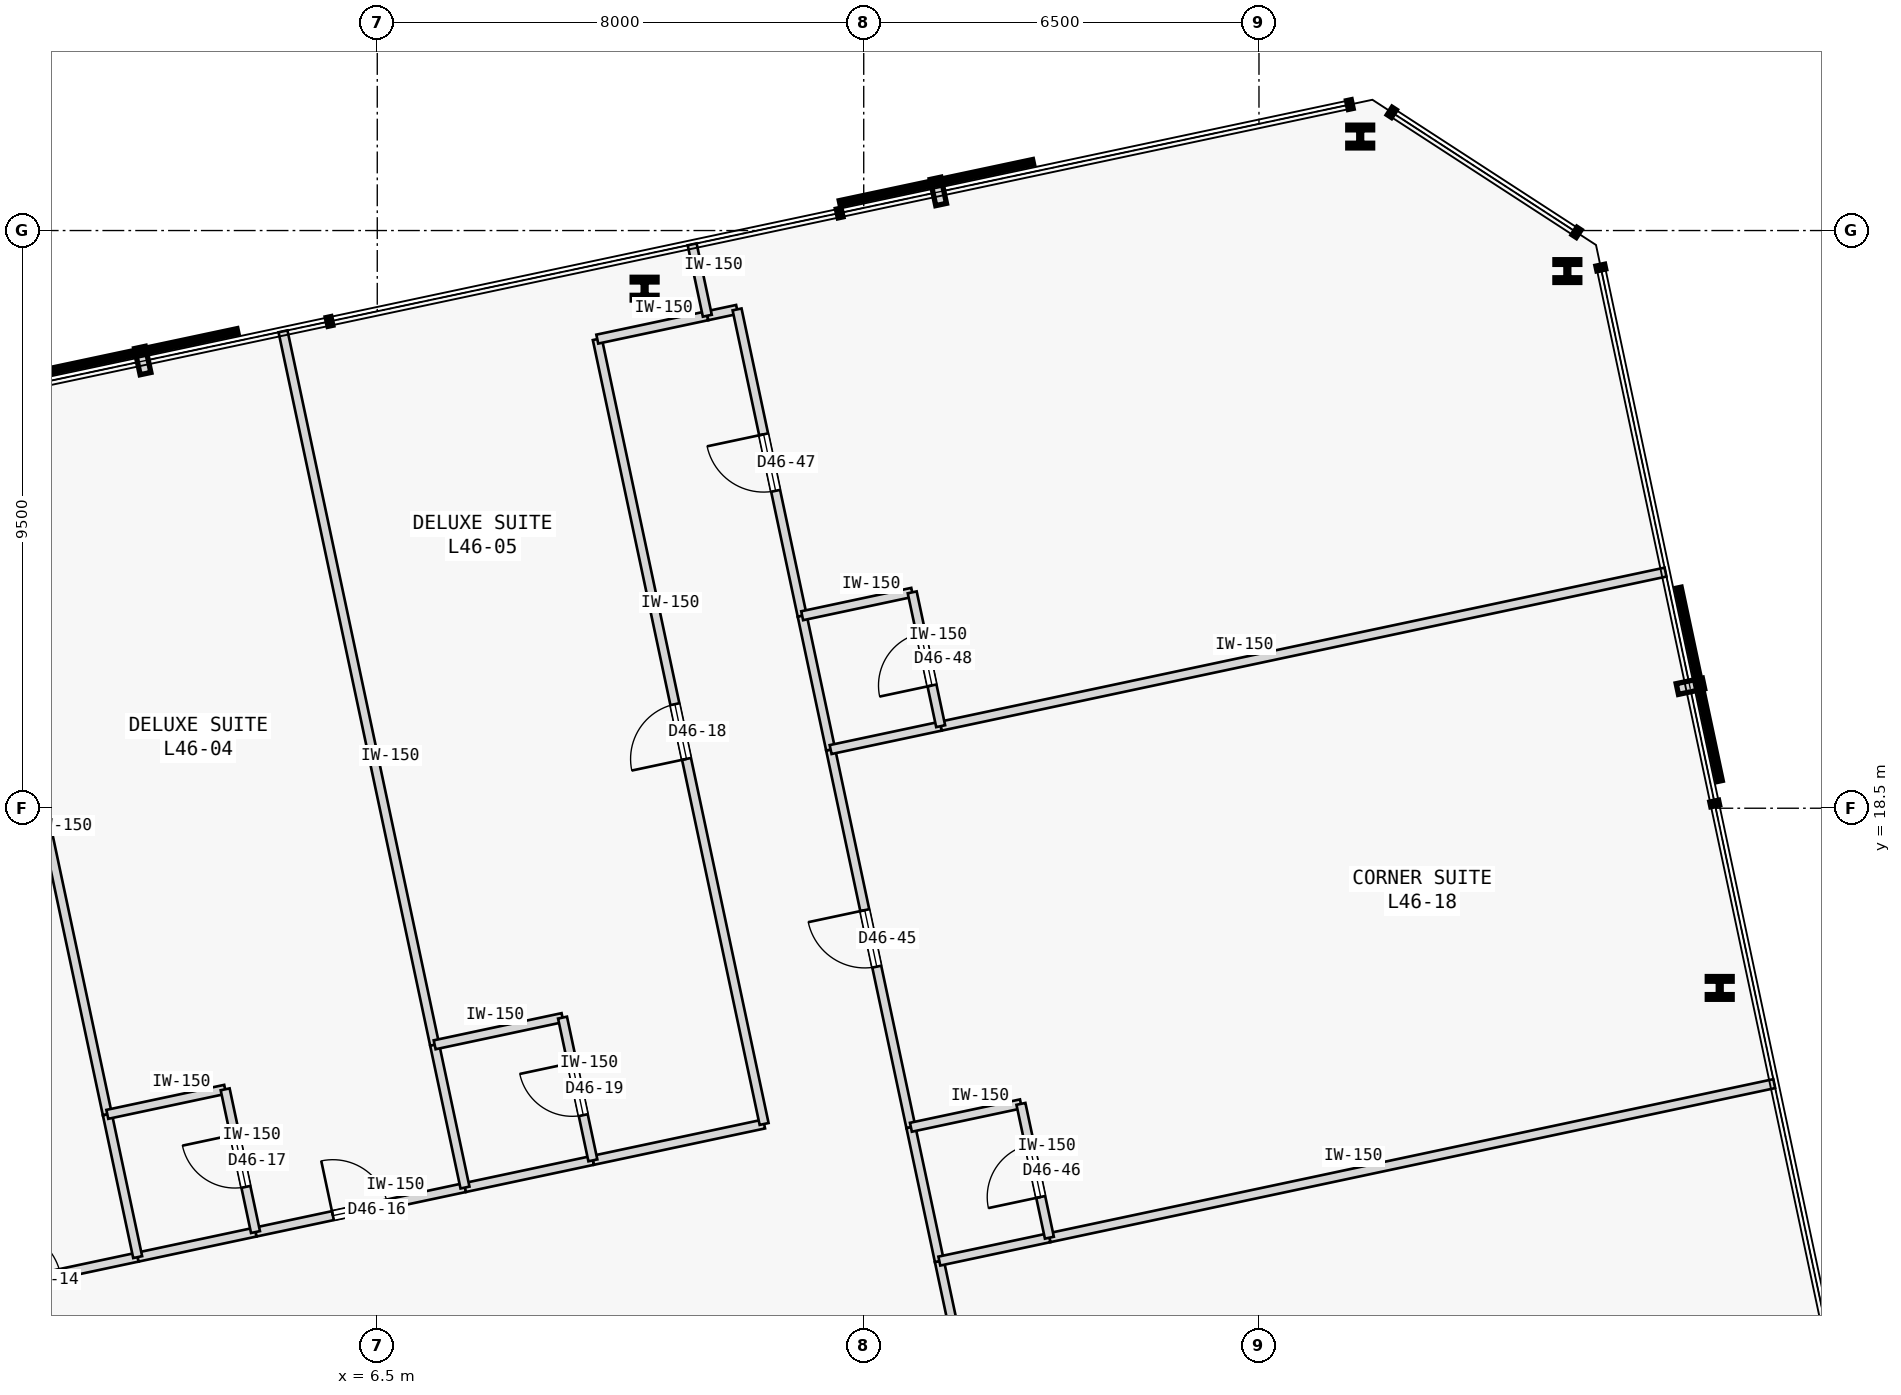
"""IFC4 building model, lengths in metres.
Left out: names, types, materials, properties, quantities, classifications, styles, units other than length and angle.
Written with IfcOpenShell. Run it as: python <this file> out.ifc"""

import sys

from ifc_helpers import new_model, si_unit, direction, frame, frame_2d, origin, origin_2d, place, context, subcontext, project, spatial, rectangle, i_section, extrude, element, fill, save


model = new_model("IFC4")
c1 = context("Model", 3, precision=1e-05, world=origin(), true_north=direction((0.0, 1.0)))
c2 = subcontext(c1, "Body", "Model", "MODEL_VIEW")
j1 = project(units=[si_unit("LENGTHUNIT", "METRE"), si_unit("PLANEANGLEUNIT", "RADIAN")], contexts=[c1])
p1 = place(None, origin())
s1 = spatial("IfcSite", under=j1, at=p1, CompositionType="ELEMENT")
p2 = place(p1, origin())
s2 = spatial("IfcBuilding", under=s1, at=p2, CompositionType="ELEMENT")
p3 = place(p2, frame((0.0, 0.0, 178.6)))
s3 = spatial("IfcBuildingStorey", under=s2, at=p3, CompositionType="ELEMENT", Elevation=178.6)
for number, where, z_axis, x_axis in (
    (1, (28.577, 15.545, 0.0), (0.0, 0.0, 1.0), (1.0, 0.0, 0.0)),
    (2, (26.071, 27.333, 0.0), (0.0, 0.0, 1.0), (1.0, 0.0, 0.0)),
    (3, (22.665, 29.546, 0.0), (0.0, 0.0, 1.0), (1.0, 0.0, 0.0)),
    (4, (10.896, 27.044, 0.0), (0.0, 0.0, 1.0), (1.0, 0.0, 0.0)),
):
    element("IfcColumn", number, at=place(p3, frame(where, z_axis=z_axis, x_axis=x_axis)), inside=s3, PredefinedType="COLUMN", context=c2, shape_type="SweptSolid", body=[
        extrude(i_section(OverallWidth=0.409, OverallDepth=0.374, WebThickness=0.048, FlangeThickness=0.077, FilletRadius=0.015, at=origin_2d()), origin(), (0.0, 0.0, 1.0), 3.4),
    ])
p4 = place(p3, frame((-0.885, 10.386, 0.0), z_axis=(0.0, 0.0, 1.0), x_axis=(0.978153036861, 0.207886114205, 0.0)))
e5 = element("IfcWall", 5, at=p4, inside=s3, PredefinedType="PARTITIONING", context=c2, shape_type="SweptSolid", body=[
    extrude(rectangle(XDim=3.522, YDim=0.15, at=frame_2d((1.761, 0.0))), origin(), (0.0, 0.0, 1.0), 3.175),
])
p5 = place(p4, frame((1.301, 0.0, 0.0)))
e6 = element("IfcOpeningElement", 6, at=p5, cuts=e5, PredefinedType="OPENING", context=c2, shape_type="SweptSolid", body=[
    extrude(rectangle(XDim=0.92, YDim=2.15, at=frame_2d((0.46, 1.075))), frame((0.0, 0.085, 0.0), z_axis=(0.0, -1.0, 0.0), x_axis=(1.0, 0.0, 0.0)), (0.0, 0.0, 1.0), 0.17),
])
p6 = place(p3, frame((4.498, 11.53, 0.0), z_axis=(0.0, 0.0, 1.0), x_axis=(0.978135941404, 0.207966536089, 0.0)))
e7 = element("IfcWall", 7, at=p6, inside=s3, PredefinedType="PARTITIONING", context=c2, shape_type="SweptSolid", body=[
    extrude(rectangle(XDim=3.522, YDim=0.15, at=frame_2d((1.761, 0.0))), origin(), (0.0, 0.0, 1.0), 3.175),
])
p7 = place(p6, frame((1.301, 0.0, 0.0)))
e8 = element("IfcOpeningElement", 8, at=p7, cuts=e7, PredefinedType="OPENING", context=c2, shape_type="SweptSolid", body=[
    extrude(rectangle(XDim=0.92, YDim=2.15, at=frame_2d((0.46, 1.075))), frame((0.0, 0.085, 0.0), z_axis=(0.0, -1.0, 0.0), x_axis=(1.0, 0.0, 0.0)), (0.0, 0.0, 1.0), 0.17),
])
p8 = place(p3, frame((2.56, 11.118, 0.0), z_axis=(0.0, 0.0, 1.0), x_axis=(0.978149140323, 0.20790444749, 0.0)))
e9 = element("IfcWall", 9, at=p8, inside=s3, PredefinedType="PARTITIONING", context=c2, shape_type="SweptSolid", body=[
    extrude(rectangle(XDim=1.981, YDim=0.15, at=frame_2d((0.99, 0.0))), origin(), (0.0, 0.0, 1.0), 3.175),
])
p9 = place(p3, frame((10.046, 12.709, 0.0), z_axis=(0.0, 0.0, 1.0), x_axis=(0.97816208355, 0.207843542851, 0.0)))
e10 = element("IfcWall", 10, at=p9, inside=s3, PredefinedType="PARTITIONING", context=c2, shape_type="SweptSolid", body=[
    extrude(rectangle(XDim=2.879, YDim=0.15, at=frame_2d((1.439, 0.0))), origin(), (0.0, 0.0, 1.0), 3.175),
])
p10 = place(p3, frame((12.862, 13.308, 0.0), z_axis=(0.0, 0.0, 1.0), x_axis=(-0.207911421929, 0.978147657888, 0.0)))
e11 = element("IfcWall", 11, at=p10, inside=s3, PredefinedType="PARTITIONING", context=c2, shape_type="SweptSolid", body=[
    extrude(rectangle(XDim=13.195, YDim=0.15, at=frame_2d((6.598, 0.0))), origin(), (0.0, 0.0, 1.0), 3.175),
])
p11 = place(p10, frame((6.137, 0.0, 0.0)))
e12 = element("IfcOpeningElement", 12, at=p11, cuts=e11, PredefinedType="OPENING", context=c2, shape_type="SweptSolid", body=[
    extrude(rectangle(XDim=0.92, YDim=2.15, at=frame_2d((0.46, 1.075))), frame((0.0, 0.085, 0.0), z_axis=(0.0, -1.0, 0.0), x_axis=(1.0, 0.0, 0.0)), (0.0, 0.0, 1.0), 0.17),
])
p12 = place(p3, frame((10.118, 26.214, 0.0), z_axis=(0.0, 0.0, 1.0), x_axis=(0.978133353907, 0.20797870558, 0.0)))
e13 = element("IfcWall", 13, at=p12, inside=s3, PredefinedType="PARTITIONING", context=c2, shape_type="SweptSolid", body=[
    extrude(rectangle(XDim=1.85, YDim=0.15, at=frame_2d((0.925, 0.0))), origin(), (0.0, 0.0, 1.0), 3.175),
])
p13 = place(p3, frame((7.943, 12.262, 0.0), z_axis=(0.0, 0.0, 1.0), x_axis=(0.978146728319, 0.207915795165, 0.0)))
e14 = element("IfcWall", 14, at=p13, inside=s3, PredefinedType="PARTITIONING", context=c2, shape_type="SweptSolid", body=[
    extrude(rectangle(XDim=2.15, YDim=0.15, at=frame_2d((1.075, 0.0))), origin(), (0.0, 0.0, 1.0), 3.175),
])
p14 = place(p3, frame((17.064, 4.841, 0.0), z_axis=(0.0, 0.0, 1.0), x_axis=(-0.207924511115, 0.978144875608, 0.0)))
e15 = element("IfcWall", 15, at=p14, inside=s3, PredefinedType="PARTITIONING", context=c2, shape_type="SweptSolid", body=[
    extrude(rectangle(XDim=6.35, YDim=0.15, at=frame_2d((3.175, 0.0))), origin(), (0.0, 0.0, 1.0), 3.175),
])
p15 = place(p14, frame((2.7, 0.0, 0.0)))
e16 = element("IfcOpeningElement", 16, at=p15, cuts=e15, PredefinedType="OPENING", context=c2, shape_type="SweptSolid", body=[
    extrude(rectangle(XDim=0.95, YDim=2.15, at=frame_2d((0.475, 1.075))), frame((0.0, 0.085, 0.0), z_axis=(0.0, -1.0, 0.0), x_axis=(1.0, 0.0, 0.0)), (0.0, 0.0, 1.0), 0.17),
])
p16 = place(p3, frame((15.276, 13.253, 0.0), z_axis=(0.0, 0.0, 1.0), x_axis=(-0.207924511115, 0.978144875608, 0.0)))
e17 = element("IfcWall", 17, at=p16, inside=s3, PredefinedType="PARTITIONING", context=c2, shape_type="SweptSolid", body=[
    extrude(rectangle(XDim=6.35, YDim=0.15, at=frame_2d((3.175, 0.0))), origin(), (0.0, 0.0, 1.0), 3.175),
])
p17 = place(p16, frame((2.7, 0.0, 0.0)))
e18 = element("IfcOpeningElement", 18, at=p17, cuts=e17, PredefinedType="OPENING", context=c2, shape_type="SweptSolid", body=[
    extrude(rectangle(XDim=0.95, YDim=2.15, at=frame_2d((0.475, 1.075))), frame((0.0, 0.085, 0.0), z_axis=(0.0, -1.0, 0.0), x_axis=(1.0, 0.0, 0.0)), (0.0, 0.0, 1.0), 0.17),
])
p18 = place(p3, frame((15.744, 11.052, 0.0), z_axis=(0.0, 0.0, 1.0), x_axis=(-0.207891197838, 0.978151956427, 0.0)))
e19 = element("IfcWall", 19, at=p18, inside=s3, PredefinedType="PARTITIONING", context=c2, shape_type="SweptSolid", body=[
    extrude(rectangle(XDim=2.25, YDim=0.15, at=frame_2d((1.125, 0.0))), origin(), (0.0, 0.0, 1.0), 3.175),
])
p19 = place(p3, frame((11.928, 26.599, 0.0), z_axis=(0.0, 0.0, 1.0), x_axis=(0.97822210712, 0.207560856478, 0.0)))
e20 = element("IfcWall", 20, at=p19, inside=s3, PredefinedType="PARTITIONING", context=c2, shape_type="SweptSolid", body=[
    extrude(rectangle(XDim=0.5, YDim=0.15, at=frame_2d((0.25, 0.0))), origin(), (0.0, 0.0, 1.0), 3.175),
])
p20 = place(p3, frame((13.488, 21.666, 0.0), z_axis=(0.0, 0.0, 1.0), x_axis=(-0.207926226209, 0.978144511028, 0.0)))
e21 = element("IfcWall", 21, at=p20, inside=s3, PredefinedType="PARTITIONING", context=c2, shape_type="SweptSolid", body=[
    extrude(rectangle(XDim=5.15, YDim=0.15, at=frame_2d((2.575, 0.0))), origin(), (0.0, 0.0, 1.0), 3.175),
])
p21 = place(p20, frame((2.1, 0.0, 0.0)))
e22 = element("IfcOpeningElement", 22, at=p21, cuts=e21, PredefinedType="OPENING", context=c2, shape_type="SweptSolid", body=[
    extrude(rectangle(XDim=0.95, YDim=2.15, at=frame_2d((0.475, 1.075))), frame((0.0, 0.085, 0.0), z_axis=(0.0, -1.0, 0.0), x_axis=(1.0, 0.0, 0.0)), (0.0, 0.0, 1.0), 0.17),
])
p22 = place(p3, frame((13.956, 19.465, 0.0), z_axis=(0.0, 0.0, 1.0), x_axis=(-0.207891197838, 0.978151956427, 0.0)))
e23 = element("IfcWall", 23, at=p22, inside=s3, PredefinedType="PARTITIONING", context=c2, shape_type="SweptSolid", body=[
    extrude(rectangle(XDim=2.25, YDim=0.15, at=frame_2d((1.125, 0.0))), origin(), (0.0, 0.0, 1.0), 3.175),
])
p23 = place(p3, frame((2.061, 13.466, 0.0), z_axis=(0.0, 0.0, 1.0), x_axis=(-0.207910848762, 0.978147779718, 0.0)))
e24 = element("IfcWall", 24, at=p23, inside=s3, PredefinedType="PARTITIONING", context=c2, shape_type="SweptSolid", body=[
    extrude(rectangle(XDim=11.995, YDim=0.15, at=frame_2d((5.998, 0.0))), origin(), (0.0, 0.0, 1.0), 3.175),
])
p24 = place(p3, frame((2.56, 11.118, 0.0), z_axis=(0.0, 0.0, 1.0), x_axis=(-0.207917150959, 0.978146440129, 0.0)))
e25 = element("IfcWall", 25, at=p24, inside=s3, PredefinedType="PARTITIONING", context=c2, shape_type="SweptSolid", body=[
    extrude(rectangle(XDim=2.4, YDim=0.15, at=frame_2d((1.2, 0.0))), origin(), (0.0, 0.0, 1.0), 3.175),
])
p25 = place(p3, frame((2.061, 13.466, 0.0), z_axis=(0.0, 0.0, 1.0), x_axis=(0.978149140323, 0.20790444749, 0.0)))
e26 = element("IfcWall", 26, at=p25, inside=s3, PredefinedType="PARTITIONING", context=c2, shape_type="SweptSolid", body=[
    extrude(rectangle(XDim=1.981, YDim=0.15, at=frame_2d((0.99, 0.0))), origin(), (0.0, 0.0, 1.0), 3.175),
])
p26 = place(p3, frame((4.498, 11.53, 0.0), z_axis=(0.0, 0.0, 1.0), x_axis=(-0.207917150959, 0.978146440129, 0.0)))
e27 = element("IfcWall", 27, at=p26, inside=s3, PredefinedType="PARTITIONING", context=c2, shape_type="SweptSolid", body=[
    extrude(rectangle(XDim=2.4, YDim=0.15, at=frame_2d((1.2, 0.0))), origin(), (0.0, 0.0, 1.0), 3.175),
])
p27 = place(p26, frame((0.76, 0.0, 0.0)))
e28 = element("IfcOpeningElement", 28, at=p27, cuts=e27, PredefinedType="OPENING", context=c2, shape_type="SweptSolid", body=[
    extrude(rectangle(XDim=0.88, YDim=2.15, at=frame_2d((0.44, 1.075))), frame((0.0, 0.085, 0.0), z_axis=(0.0, -1.0, 0.0), x_axis=(1.0, 0.0, 0.0)), (0.0, 0.0, 1.0), 0.17),
])
p28 = place(p3, frame((7.444, 14.61, 0.0), z_axis=(0.0, 0.0, 1.0), x_axis=(-0.207910848762, 0.978147779718, 0.0)))
e29 = element("IfcWall", 29, at=p28, inside=s3, PredefinedType="PARTITIONING", context=c2, shape_type="SweptSolid", body=[
    extrude(rectangle(XDim=11.995, YDim=0.15, at=frame_2d((5.998, 0.0))), origin(), (0.0, 0.0, 1.0), 3.175),
])
p29 = place(p3, frame((7.943, 12.262, 0.0), z_axis=(0.0, 0.0, 1.0), x_axis=(-0.207937840262, 0.978142042133, 0.0)))
e30 = element("IfcWall", 30, at=p29, inside=s3, PredefinedType="PARTITIONING", context=c2, shape_type="SweptSolid", body=[
    extrude(rectangle(XDim=2.4, YDim=0.15, at=frame_2d((1.2, 0.0))), origin(), (0.0, 0.0, 1.0), 3.175),
])
p30 = place(p3, frame((7.444, 14.61, 0.0), z_axis=(0.0, 0.0, 1.0), x_axis=(0.978151636287, 0.207892704126, 0.0)))
e31 = element("IfcWall", 31, at=p30, inside=s3, PredefinedType="PARTITIONING", context=c2, shape_type="SweptSolid", body=[
    extrude(rectangle(XDim=2.15, YDim=0.15, at=frame_2d((1.075, 0.0))), origin(), (0.0, 0.0, 1.0), 3.175),
])
p31 = place(p3, frame((10.046, 12.709, 0.0), z_axis=(0.0, 0.0, 1.0), x_axis=(-0.207840504985, 0.978162729042, 0.0)))
e32 = element("IfcWall", 32, at=p31, inside=s3, PredefinedType="PARTITIONING", context=c2, shape_type="SweptSolid", body=[
    extrude(rectangle(XDim=2.4, YDim=0.15, at=frame_2d((1.2, 0.0))), origin(), (0.0, 0.0, 1.0), 3.175),
])
p32 = place(p31, frame((0.76, 0.0, 0.0)))
e33 = element("IfcOpeningElement", 33, at=p32, cuts=e32, PredefinedType="OPENING", context=c2, shape_type="SweptSolid", body=[
    extrude(rectangle(XDim=0.88, YDim=2.15, at=frame_2d((0.44, 1.075))), frame((0.0, 0.085, 0.0), z_axis=(0.0, -1.0, 0.0), x_axis=(1.0, 0.0, 0.0)), (0.0, 0.0, 1.0), 0.17),
])
p33 = place(p3, frame((11.928, 26.599, 0.0), z_axis=(0.0, 0.0, 1.0), x_axis=(-0.20795853359, 0.978137642823, 0.0)))
e34 = element("IfcWall", 34, at=p33, inside=s3, PredefinedType="PARTITIONING", context=c2, shape_type="SweptSolid", body=[
    extrude(rectangle(XDim=1.2, YDim=0.15, at=frame_2d((0.6, 0.0))), origin(), (0.0, 0.0, 1.0), 3.175),
])
p34 = place(p3, frame((17.553, 11.437, 0.0), z_axis=(0.0, 0.0, 1.0), x_axis=(0.97814556055, 0.207921288896, 0.0)))
e35 = element("IfcWall", 35, at=p34, inside=s3, PredefinedType="PARTITIONING", context=c2, shape_type="SweptSolid", body=[
    extrude(rectangle(XDim=12.187, YDim=0.15, at=frame_2d((6.094, 0.0))), origin(), (0.0, 0.0, 1.0), 3.175),
])
for number, where, z_axis, x_axis in (
    (36, (15.744, 11.052, 0.0), (0.0, 0.0, 1.0), (0.978, 0.208, 0.0)),
    (37, (15.276, 13.253, 0.0), (0.0, 0.0, 1.0), (0.978, 0.208, 0.0)),
):
    element("IfcWall", number, at=place(p3, frame(where, z_axis=z_axis, x_axis=x_axis)), inside=s3, PredefinedType="PARTITIONING", context=c2, shape_type="SweptSolid", body=[
        extrude(rectangle(XDim=1.85, YDim=0.15, at=frame_2d((0.925, 0.0))), origin(), (0.0, 0.0, 1.0), 3.175),
    ])
p35 = place(p3, frame((17.553, 11.437, 0.0), z_axis=(0.0, 0.0, 1.0), x_axis=(-0.207891197838, 0.978151956427, 0.0)))
e38 = element("IfcWall", 38, at=p35, inside=s3, PredefinedType="PARTITIONING", context=c2, shape_type="SweptSolid", body=[
    extrude(rectangle(XDim=2.25, YDim=0.15, at=frame_2d((1.125, 0.0))), origin(), (0.0, 0.0, 1.0), 3.175),
])
p36 = place(p35, frame((0.685, 0.0, 0.0)))
e39 = element("IfcOpeningElement", 39, at=p36, cuts=e38, PredefinedType="OPENING", context=c2, shape_type="SweptSolid", body=[
    extrude(rectangle(XDim=0.88, YDim=2.15, at=frame_2d((0.44, 1.075))), frame((0.0, 0.085, 0.0), z_axis=(0.0, -1.0, 0.0), x_axis=(1.0, 0.0, 0.0)), (0.0, 0.0, 1.0), 0.17),
])
p37 = place(p3, frame((15.765, 19.849, 0.0), z_axis=(0.0, 0.0, 1.0), x_axis=(0.978149634612, 0.207902121941, 0.0)))
e40 = element("IfcWall", 40, at=p37, inside=s3, PredefinedType="PARTITIONING", context=c2, shape_type="SweptSolid", body=[
    extrude(rectangle(XDim=12.187, YDim=0.15, at=frame_2d((6.094, 0.0))), origin(), (0.0, 0.0, 1.0), 3.175),
])
for number, where, z_axis, x_axis in (
    (41, (13.956, 19.465, 0.0), (0.0, 0.0, 1.0), (0.978, 0.208, 0.0)),
    (42, (13.488, 21.666, 0.0), (0.0, 0.0, 1.0), (0.978, 0.208, 0.0)),
):
    element("IfcWall", number, at=place(p3, frame(where, z_axis=z_axis, x_axis=x_axis)), inside=s3, PredefinedType="PARTITIONING", context=c2, shape_type="SweptSolid", body=[
        extrude(rectangle(XDim=1.85, YDim=0.15, at=frame_2d((0.925, 0.0))), origin(), (0.0, 0.0, 1.0), 3.175),
    ])
p38 = place(p3, frame((15.765, 19.849, 0.0), z_axis=(0.0, 0.0, 1.0), x_axis=(-0.207891197838, 0.978151956427, 0.0)))
e43 = element("IfcWall", 43, at=p38, inside=s3, PredefinedType="PARTITIONING", context=c2, shape_type="SweptSolid", body=[
    extrude(rectangle(XDim=2.25, YDim=0.15, at=frame_2d((1.125, 0.0))), origin(), (0.0, 0.0, 1.0), 3.175),
])
p39 = place(p38, frame((0.685, 0.0, 0.0)))
e44 = element("IfcOpeningElement", 44, at=p39, cuts=e43, PredefinedType="OPENING", context=c2, shape_type="SweptSolid", body=[
    extrude(rectangle(XDim=0.88, YDim=2.15, at=frame_2d((0.44, 1.075))), frame((0.0, 0.085, 0.0), z_axis=(0.0, -1.0, 0.0), x_axis=(1.0, 0.0, 0.0)), (0.0, 0.0, 1.0), 0.17),
])
p40 = place(p5, origin())
e45 = element("IfcDoor", 45, at=p40, inside=s3, OperationType="SINGLE_SWING_LEFT", PredefinedType="DOOR", context=c2, shape_type="SweptSolid", body=[
    extrude(rectangle(XDim=0.92, YDim=2.15, at=frame_2d((0.46, 1.075))), frame((0.0, 0.025, 0.0), z_axis=(0.0, -1.0, 0.0), x_axis=(1.0, 0.0, 0.0)), (0.0, 0.0, 1.0), 0.05),
])
fill(e6, e45)
p41 = place(p7, origin())
e46 = element("IfcDoor", 46, at=p41, inside=s3, OperationType="SINGLE_SWING_LEFT", PredefinedType="DOOR", context=c2, shape_type="SweptSolid", body=[
    extrude(rectangle(XDim=0.92, YDim=2.15, at=frame_2d((0.46, 1.075))), frame((0.0, 0.025, 0.0), z_axis=(0.0, -1.0, 0.0), x_axis=(1.0, 0.0, 0.0)), (0.0, 0.0, 1.0), 0.05),
])
fill(e8, e46)
p42 = place(p27, origin())
e47 = element("IfcDoor", 47, at=p42, inside=s3, OperationType="SINGLE_SWING_RIGHT", PredefinedType="DOOR", context=c2, shape_type="SweptSolid", body=[
    extrude(rectangle(XDim=0.88, YDim=2.15, at=frame_2d((0.44, 1.075))), frame((0.0, 0.025, 0.0), z_axis=(0.0, -1.0, 0.0), x_axis=(1.0, 0.0, 0.0)), (0.0, 0.0, 1.0), 0.05),
])
fill(e28, e47)
p43 = place(p11, origin())
e48 = element("IfcDoor", 48, at=p43, inside=s3, OperationType="SINGLE_SWING_LEFT", PredefinedType="DOOR", context=c2, shape_type="SweptSolid", body=[
    extrude(rectangle(XDim=0.92, YDim=2.15, at=frame_2d((0.46, 1.075))), frame((0.0, 0.025, 0.0), z_axis=(0.0, -1.0, 0.0), x_axis=(1.0, 0.0, 0.0)), (0.0, 0.0, 1.0), 0.05),
])
fill(e12, e48)
p44 = place(p32, origin())
e49 = element("IfcDoor", 49, at=p44, inside=s3, OperationType="SINGLE_SWING_RIGHT", PredefinedType="DOOR", context=c2, shape_type="SweptSolid", body=[
    extrude(rectangle(XDim=0.88, YDim=2.15, at=frame_2d((0.44, 1.075))), frame((0.0, 0.025, 0.0), z_axis=(0.0, -1.0, 0.0), x_axis=(1.0, 0.0, 0.0)), (0.0, 0.0, 1.0), 0.05),
])
fill(e33, e49)
p45 = place(p17, origin())
e50 = element("IfcDoor", 50, at=p45, inside=s3, OperationType="SINGLE_SWING_RIGHT", PredefinedType="DOOR", context=c2, shape_type="SweptSolid", body=[
    extrude(rectangle(XDim=0.95, YDim=2.15, at=frame_2d((0.475, 1.075))), frame((0.0, 0.025, 0.0), z_axis=(0.0, -1.0, 0.0), x_axis=(1.0, 0.0, 0.0)), (0.0, 0.0, 1.0), 0.05),
])
fill(e18, e50)
p46 = place(p36, origin())
e51 = element("IfcDoor", 51, at=p46, inside=s3, OperationType="SINGLE_SWING_LEFT", PredefinedType="DOOR", context=c2, shape_type="SweptSolid", body=[
    extrude(rectangle(XDim=0.88, YDim=2.15, at=frame_2d((0.44, 1.075))), frame((0.0, 0.025, 0.0), z_axis=(0.0, -1.0, 0.0), x_axis=(1.0, 0.0, 0.0)), (0.0, 0.0, 1.0), 0.05),
])
fill(e39, e51)
p47 = place(p21, origin())
e52 = element("IfcDoor", 52, at=p47, inside=s3, OperationType="SINGLE_SWING_RIGHT", PredefinedType="DOOR", context=c2, shape_type="SweptSolid", body=[
    extrude(rectangle(XDim=0.95, YDim=2.15, at=frame_2d((0.475, 1.075))), frame((0.0, 0.025, 0.0), z_axis=(0.0, -1.0, 0.0), x_axis=(1.0, 0.0, 0.0)), (0.0, 0.0, 1.0), 0.05),
])
fill(e22, e52)
p48 = place(p39, origin())
e53 = element("IfcDoor", 53, at=p48, inside=s3, OperationType="SINGLE_SWING_LEFT", PredefinedType="DOOR", context=c2, shape_type="SweptSolid", body=[
    extrude(rectangle(XDim=0.88, YDim=2.15, at=frame_2d((0.44, 1.075))), frame((0.0, 0.025, 0.0), z_axis=(0.0, -1.0, 0.0), x_axis=(1.0, 0.0, 0.0)), (0.0, 0.0, 1.0), 0.05),
])
fill(e44, e53)
save(model, sys.argv[1])
